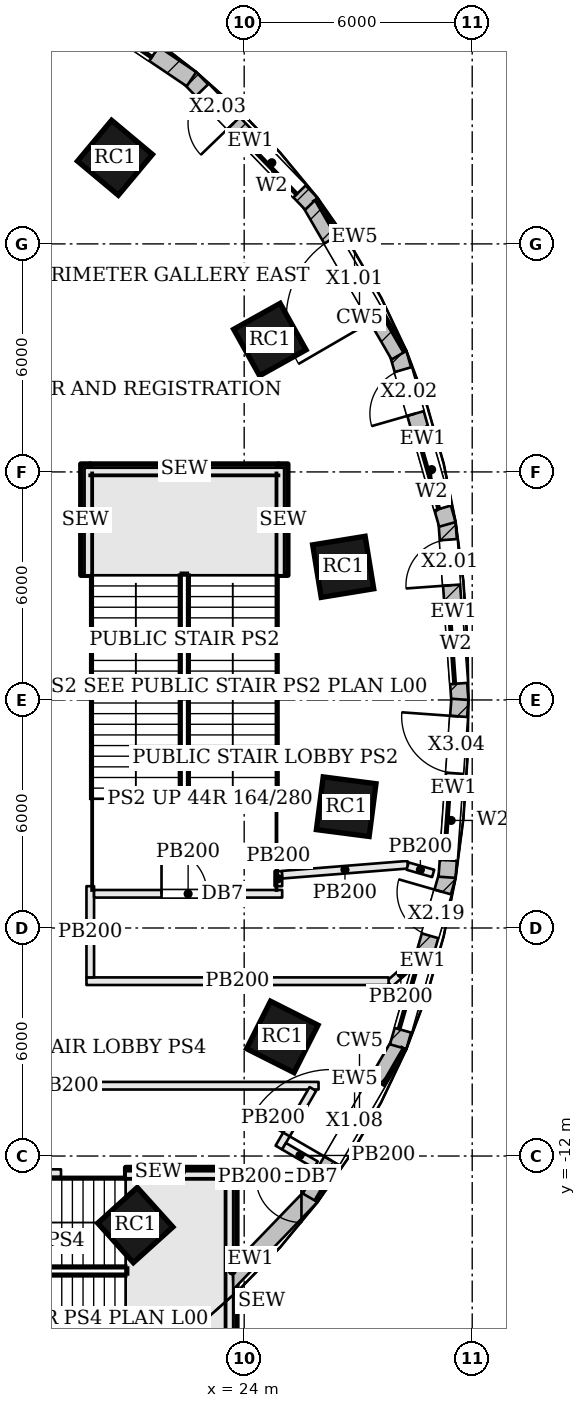
"""IFC4 building model, lengths in metres.
Left out: names, types, materials, properties, quantities, classifications, styles, units other than length and angle.
Written with IfcOpenShell. Run it as: python <this file> out.ifc"""

import sys

from ifc_helpers import new_model, si_unit, direction, frame, frame_2d, origin, origin_2d, place, context, subcontext, project, spatial, rectangle, extrude, element, fill, save


model = new_model("IFC4")
c1 = context("Model", 3, precision=1e-05, world=origin(), true_north=direction((0.0, 1.0)))
c2 = subcontext(c1, "Body", "Model", "MODEL_VIEW")
j1 = project(units=[si_unit("LENGTHUNIT", "METRE"), si_unit("PLANEANGLEUNIT", "RADIAN")], contexts=[c1])
p1 = place(None, origin())
s1 = spatial("IfcSite", under=j1, at=p1, CompositionType="ELEMENT")
p2 = place(p1, origin())
s2 = spatial("IfcBuilding", under=s1, at=p2, CompositionType="ELEMENT")
p3 = place(p2, origin())
s3 = spatial("IfcBuildingStorey", under=s2, at=p3, CompositionType="ELEMENT", Elevation=0.0)
for number, where, z_axis, x_axis in (
    (1, (26.605, 3.503, 0.0), (0.0, 0.0, 1.0), (-0.161, 0.987, 0.0)),
    (2, (24.676, 9.483, 0.0), (0.0, 0.0, 1.0), (-0.487, 0.873, 0.0)),
    (3, (20.6, 14.266, 0.0), (0.0, 0.0, 1.0), (-0.767, 0.641, 0.0)),
    (4, (21.135, -13.817, 0.0), (0.0, 0.0, 1.0), (0.743, 0.67, 0.0)),
    (5, (25.003, -8.866, 0.0), (0.0, 0.0, 1.0), (0.45, 0.893, 0.0)),
    (6, (26.684, -2.808, 0.0), (0.0, 0.0, 1.0), (0.128, 0.992, 0.0)),
):
    element("IfcColumn", number, at=place(p3, frame(where, z_axis=z_axis, x_axis=x_axis)), inside=s3, PredefinedType="COLUMN", context=c2, shape_type="SweptSolid", body=[
        extrude(rectangle(XDim=1.4, YDim=1.4, at=origin_2d()), origin(), (0.0, 0.0, 1.0), 7.2),
    ])
p4 = place(p3, frame((29.676, -0.016, 0.0), z_axis=(0.0, 0.0, 1.0), x_axis=(-0.071775601577, 0.997420805387, 0.0)))
e7 = element("IfcWall", 7, at=p4, inside=s3, PredefinedType="SOLIDWALL", context=c2, shape_type="SweptSolid", body=[
    extrude(rectangle(XDim=4.694, YDim=0.45, at=frame_2d((2.347, 0.0))), origin(), (0.0, 0.0, 1.0), 6.95),
])
p5 = place(p4, frame((0.45, 0.0, 0.9)))
e8 = element("IfcOpeningElement", 8, at=p5, cuts=e7, PredefinedType="OPENING", context=c2, shape_type="SweptSolid", body=[
    extrude(rectangle(XDim=2.1, YDim=5.0, at=frame_2d((1.05, 2.5))), frame((0.0, 0.235, 0.0), z_axis=(0.0, -1.0, 0.0), x_axis=(1.0, 0.0, 0.0)), (0.0, 0.0, 1.0), 0.47),
])
p6 = place(p4, frame((3.044, 0.0, 0.0)))
e9 = element("IfcOpeningElement", 9, at=p6, cuts=e7, PredefinedType="OPENING", context=c2, shape_type="SweptSolid", body=[
    extrude(rectangle(XDim=1.2, YDim=2.4, at=frame_2d((0.6, 1.2))), frame((0.0, 0.235, 0.0), z_axis=(0.0, -1.0, 0.0), x_axis=(1.0, 0.0, 0.0)), (0.0, 0.0, 1.0), 0.47),
])
p7 = place(p3, frame((29.347, 4.62, 0.0), z_axis=(0.0, 0.0, 1.0), x_axis=(-0.27637239746, 0.961050621935, 0.0)))
e10 = element("IfcWall", 10, at=p7, inside=s3, PredefinedType="SOLIDWALL", context=c2, shape_type="SweptSolid", body=[
    extrude(rectangle(XDim=4.685, YDim=0.45, at=frame_2d((2.343, 0.0))), origin(), (0.0, 0.0, 1.0), 6.95),
])
p8 = place(p7, frame((0.45, 0.0, 0.9)))
e11 = element("IfcOpeningElement", 11, at=p8, cuts=e10, PredefinedType="OPENING", context=c2, shape_type="SweptSolid", body=[
    extrude(rectangle(XDim=2.1, YDim=5.0, at=frame_2d((1.05, 2.5))), frame((0.0, 0.235, 0.0), z_axis=(0.0, -1.0, 0.0), x_axis=(1.0, 0.0, 0.0)), (0.0, 0.0, 1.0), 0.47),
])
p9 = place(p7, frame((3.035, 0.0, 0.0)))
e12 = element("IfcOpeningElement", 12, at=p9, cuts=e10, PredefinedType="OPENING", context=c2, shape_type="SweptSolid", body=[
    extrude(rectangle(XDim=1.2, YDim=2.4, at=frame_2d((0.6, 1.2))), frame((0.0, 0.235, 0.0), z_axis=(0.0, -1.0, 0.0), x_axis=(1.0, 0.0, 0.0)), (0.0, 0.0, 1.0), 0.47),
])
p10 = place(p3, frame((28.073, 9.072, 0.0), z_axis=(0.0, 0.0, 1.0), x_axis=(-0.502106426501, 0.864805837438, 0.0)))
e13 = element("IfcWall", 13, at=p10, inside=s3, PredefinedType="SOLIDWALL", context=c2, shape_type="SweptSolid", body=[
    extrude(rectangle(XDim=4.657, YDim=0.45, at=frame_2d((2.328, 0.0))), origin(), (0.0, 0.0, 1.0), 3.55),
])
p11 = place(p10, frame((1.128, 0.0, 0.0)))
e14 = element("IfcOpeningElement", 14, at=p11, cuts=e13, PredefinedType="OPENING", context=c2, shape_type="SweptSolid", body=[
    extrude(rectangle(XDim=2.4, YDim=3.2, at=frame_2d((1.2, 1.6))), frame((0.0, 0.235, 0.0), z_axis=(0.0, -1.0, 0.0), x_axis=(1.0, 0.0, 0.0)), (0.0, 0.0, 1.0), 0.47),
])
p12 = place(p3, frame((25.768, 13.056, 0.0), z_axis=(0.0, 0.0, 1.0), x_axis=(-0.694191591241, 0.719790271294, 0.0)))
e15 = element("IfcWall", 15, at=p12, inside=s3, PredefinedType="SOLIDWALL", context=c2, shape_type="SweptSolid", body=[
    extrude(rectangle(XDim=4.597, YDim=0.45, at=frame_2d((2.298, 0.0))), origin(), (0.0, 0.0, 1.0), 6.95),
])
p13 = place(p12, frame((0.45, 0.0, 0.9)))
e16 = element("IfcOpeningElement", 16, at=p13, cuts=e15, PredefinedType="OPENING", context=c2, shape_type="SweptSolid", body=[
    extrude(rectangle(XDim=2.1, YDim=5.0, at=frame_2d((1.05, 2.5))), frame((0.0, 0.235, 0.0), z_axis=(0.0, -1.0, 0.0), x_axis=(1.0, 0.0, 0.0)), (0.0, 0.0, 1.0), 0.47),
])
p14 = place(p12, frame((2.947, 0.0, 0.0)))
e17 = element("IfcOpeningElement", 17, at=p14, cuts=e15, PredefinedType="OPENING", context=c2, shape_type="SweptSolid", body=[
    extrude(rectangle(XDim=1.2, YDim=2.4, at=frame_2d((0.6, 1.2))), frame((0.0, 0.235, 0.0), z_axis=(0.0, -1.0, 0.0), x_axis=(1.0, 0.0, 0.0)), (0.0, 0.0, 1.0), 0.47),
])
p15 = place(p3, frame((22.613, 16.334, 0.0), z_axis=(0.0, 0.0, 1.0), x_axis=(-0.828976924359, 0.559282807604, 0.0)))
e18 = element("IfcWall", 18, at=p15, inside=s3, PredefinedType="SOLIDWALL", context=c2, shape_type="SweptSolid", body=[
    extrude(rectangle(XDim=4.479, YDim=0.45, at=frame_2d((2.24, 0.0))), origin(), (0.0, 0.0, 1.0), 6.95),
])
p16 = place(p15, frame((1.189, 0.0, 0.9)))
e19 = element("IfcOpeningElement", 19, at=p16, cuts=e18, PredefinedType="OPENING", context=c2, shape_type="SweptSolid", body=[
    extrude(rectangle(XDim=2.1, YDim=5.0, at=frame_2d((1.05, 2.5))), frame((0.0, 0.235, 0.0), z_axis=(0.0, -1.0, 0.0), x_axis=(1.0, 0.0, 0.0)), (0.0, 0.0, 1.0), 0.47),
])
p17 = place(p3, frame((18.9, -18.84, 0.0), z_axis=(0.0, 0.0, 1.0), x_axis=(0.828976924359, 0.559282807604, 0.0)))
e20 = element("IfcWall", 20, at=p17, inside=s3, PredefinedType="SOLIDWALL", context=c2, shape_type="SweptSolid", body=[
    extrude(rectangle(XDim=4.479, YDim=0.45, at=frame_2d((2.24, 0.0))), origin(), (0.0, 0.0, 1.0), 6.95),
])
p18 = place(p3, frame((22.577, -16.365, 0.0), z_axis=(0.0, 0.0, 1.0), x_axis=(0.694191591241, 0.719790271294, 0.0)))
e21 = element("IfcWall", 21, at=p18, inside=s3, PredefinedType="SOLIDWALL", context=c2, shape_type="SweptSolid", body=[
    extrude(rectangle(XDim=4.597, YDim=0.45, at=frame_2d((2.298, 0.0))), origin(), (0.0, 0.0, 1.0), 6.95),
])
p19 = place(p3, frame((25.735, -13.099, 0.0), z_axis=(0.0, 0.0, 1.0), x_axis=(0.502106426501, 0.864805837438, 0.0)))
e22 = element("IfcWall", 22, at=p19, inside=s3, PredefinedType="SOLIDWALL", context=c2, shape_type="SweptSolid", body=[
    extrude(rectangle(XDim=4.657, YDim=0.45, at=frame_2d((2.328, 0.0))), origin(), (0.0, 0.0, 1.0), 3.55),
])
p20 = place(p19, frame((1.128, 0.0, 0.0)))
e23 = element("IfcOpeningElement", 23, at=p20, cuts=e22, PredefinedType="OPENING", context=c2, shape_type="SweptSolid", body=[
    extrude(rectangle(XDim=2.4, YDim=3.2, at=frame_2d((1.2, 1.6))), frame((0.0, 0.235, 0.0), z_axis=(0.0, -1.0, 0.0), x_axis=(1.0, 0.0, 0.0)), (0.0, 0.0, 1.0), 0.47),
])
p21 = place(p3, frame((28.052, -9.123, 0.0), z_axis=(0.0, 0.0, 1.0), x_axis=(0.27637239746, 0.961050621935, 0.0)))
e24 = element("IfcWall", 24, at=p21, inside=s3, PredefinedType="SOLIDWALL", context=c2, shape_type="SweptSolid", body=[
    extrude(rectangle(XDim=4.685, YDim=0.45, at=frame_2d((2.343, 0.0))), origin(), (0.0, 0.0, 1.0), 6.95),
])
p22 = place(p21, frame((0.45, 0.0, 0.9)))
e25 = element("IfcOpeningElement", 25, at=p22, cuts=e24, PredefinedType="OPENING", context=c2, shape_type="SweptSolid", body=[
    extrude(rectangle(XDim=2.1, YDim=5.0, at=frame_2d((1.05, 2.5))), frame((0.0, 0.235, 0.0), z_axis=(0.0, -1.0, 0.0), x_axis=(1.0, 0.0, 0.0)), (0.0, 0.0, 1.0), 0.47),
])
p23 = place(p21, frame((3.035, 0.0, 0.0)))
e26 = element("IfcOpeningElement", 26, at=p23, cuts=e24, PredefinedType="OPENING", context=c2, shape_type="SweptSolid", body=[
    extrude(rectangle(XDim=1.2, YDim=2.4, at=frame_2d((0.6, 1.2))), frame((0.0, 0.235, 0.0), z_axis=(0.0, -1.0, 0.0), x_axis=(1.0, 0.0, 0.0)), (0.0, 0.0, 1.0), 0.47),
])
p24 = place(p3, frame((29.339, -4.666, 0.0), z_axis=(0.0, 0.0, 1.0), x_axis=(0.071775601577, 0.997420805387, 0.0)))
e27 = element("IfcWall", 27, at=p24, inside=s3, PredefinedType="SOLIDWALL", context=c2, shape_type="SweptSolid", body=[
    extrude(rectangle(XDim=4.694, YDim=0.45, at=frame_2d((2.347, 0.0))), origin(), (0.0, 0.0, 1.0), 6.95),
])
p25 = place(p24, frame((0.45, 0.0, 0.9)))
e28 = element("IfcOpeningElement", 28, at=p25, cuts=e27, PredefinedType="OPENING", context=c2, shape_type="SweptSolid", body=[
    extrude(rectangle(XDim=2.1, YDim=5.0, at=frame_2d((1.05, 2.5))), frame((0.0, 0.235, 0.0), z_axis=(0.0, -1.0, 0.0), x_axis=(1.0, 0.0, 0.0)), (0.0, 0.0, 1.0), 0.47),
])
p26 = place(p24, frame((2.744, 0.0, 0.0)))
e29 = element("IfcOpeningElement", 29, at=p26, cuts=e27, PredefinedType="OPENING", context=c2, shape_type="SweptSolid", body=[
    extrude(rectangle(XDim=1.5, YDim=2.4, at=frame_2d((0.75, 1.2))), frame((0.0, 0.235, 0.0), z_axis=(0.0, -1.0, 0.0), x_axis=(1.0, 0.0, 0.0)), (0.0, 0.0, 1.0), 0.47),
])
p27 = place(p3, frame((28.419, -6.939, 0.0), z_axis=(0.0, 0.0, 1.0), x_axis=(-0.747968781753, -0.663733908674, 0.0)))
e30 = element("IfcWall", 30, at=p27, inside=s3, PredefinedType="PARTITIONING", context=c2, shape_type="SweptSolid", body=[
    extrude(rectangle(XDim=0.794, YDim=0.2, at=frame_2d((0.397, 0.0))), origin(), (0.0, 0.0, 1.0), 6.23),
])
p28 = place(p3, frame((27.8, -7.4, 0.0), z_axis=(0.0, 0.0, 1.0), x_axis=(-1.0, 0.0, 0.0)))
e31 = element("IfcWall", 31, at=p28, inside=s3, PredefinedType="PARTITIONING", context=c2, shape_type="SweptSolid", body=[
    extrude(rectangle(XDim=7.95, YDim=0.2, at=frame_2d((3.975, 0.0))), origin(), (0.0, 0.0, 1.0), 6.23),
])
p29 = place(p3, frame((19.95, -7.3, 0.0), z_axis=(0.0, 0.0, 1.0), x_axis=(0.0, 1.0, 0.0)))
e32 = element("IfcWall", 32, at=p29, inside=s3, PredefinedType="PARTITIONING", context=c2, shape_type="SweptSolid", body=[
    extrude(rectangle(XDim=2.4, YDim=0.2, at=frame_2d((1.2, 0.0))), origin(), (0.0, 0.0, 1.0), 6.23),
])
p30 = place(p3, frame((20.05, -5.1, 0.0), z_axis=(0.0, 0.0, 1.0), x_axis=(1.0, 0.0, 0.0)))
e33 = element("IfcWall", 33, at=p30, inside=s3, PredefinedType="PARTITIONING", context=c2, shape_type="SweptSolid", body=[
    extrude(rectangle(XDim=4.95, YDim=0.2, at=frame_2d((2.475, 0.0))), origin(), (0.0, 0.0, 1.0), 6.23),
])
p31 = place(p30, frame((1.775, 0.0, 0.0)))
e34 = element("IfcOpeningElement", 34, at=p31, cuts=e33, PredefinedType="OPENING", context=c2, shape_type="SweptSolid", body=[
    extrude(rectangle(XDim=1.2, YDim=2.1, at=frame_2d((0.6, 1.05))), frame((0.0, 0.11, 0.0), z_axis=(0.0, -1.0, 0.0), x_axis=(1.0, 0.0, 0.0)), (0.0, 0.0, 1.0), 0.22),
])
p32 = place(p3, frame((24.9, -4.9, 0.0), z_axis=(0.0, 0.0, 1.0), x_axis=(0.0, 1.0, 0.0)))
e35 = element("IfcWall", 35, at=p32, inside=s3, PredefinedType="PARTITIONING", context=c2, shape_type="SweptSolid", body=[
    extrude(rectangle(XDim=0.394, YDim=0.2, at=frame_2d((0.197, 0.0))), origin(), (0.0, 0.0, 1.0), 6.23),
])
p33 = place(p3, frame((25.0, -4.598, 0.0), z_axis=(0.0, 0.0, 1.0), x_axis=(0.996848217345, 0.079332411888, 0.0)))
e36 = element("IfcWall", 36, at=p33, inside=s3, PredefinedType="PARTITIONING", context=c2, shape_type="SweptSolid", body=[
    extrude(rectangle(XDim=3.314, YDim=0.2, at=frame_2d((1.657, 0.0))), origin(), (0.0, 0.0, 1.0), 6.23),
])
p34 = place(p3, frame((28.3, -4.371, 0.0), z_axis=(0.0, 0.0, 1.0), x_axis=(0.961286670839, -0.275550243092, 0.0)))
e37 = element("IfcWall", 37, at=p34, inside=s3, PredefinedType="PARTITIONING", context=c2, shape_type="SweptSolid", body=[
    extrude(rectangle(XDim=0.7, YDim=0.2, at=frame_2d((0.35, 0.0))), origin(), (0.0, 0.0, 1.0), 6.23),
])
p35 = place(p3, frame((25.66, -12.55, 0.0), z_axis=(0.0, 0.0, 1.0), x_axis=(-1.0, 0.0, 0.0)))
e38 = element("IfcWall", 38, at=p35, inside=s3, PredefinedType="PARTITIONING", context=c2, shape_type="SweptSolid", body=[
    extrude(rectangle(XDim=1.83, YDim=0.2, at=frame_2d((0.915, 0.0))), origin(), (0.0, 0.0, 1.0), 6.23),
])
p36 = place(p35, frame((0.153, 0.0, 0.0)))
e39 = element("IfcOpeningElement", 39, at=p36, cuts=e38, PredefinedType="OPENING", context=c2, shape_type="SweptSolid", body=[
    extrude(rectangle(XDim=1.2, YDim=2.1, at=frame_2d((0.6, 1.05))), frame((0.0, 0.11, 0.0), z_axis=(0.0, -1.0, 0.0), x_axis=(1.0, 0.0, 0.0)), (0.0, 0.0, 1.0), 0.22),
])
p37 = place(p3, frame((19.18, -12.45, 0.0), z_axis=(0.0, 0.0, 1.0), x_axis=(-1.0, 0.0, 0.0)))
e40 = element("IfcWall", 40, at=p37, inside=s3, PredefinedType="PARTITIONING", context=c2, shape_type="SweptSolid", body=[
    extrude(rectangle(XDim=6.68, YDim=0.2, at=frame_2d((3.34, 0.0))), origin(), (0.0, 0.0, 1.0), 6.23),
])
p38 = place(p37, frame((4.78, 0.0, 0.0)))
e41 = element("IfcOpeningElement", 41, at=p38, cuts=e40, PredefinedType="OPENING", context=c2, shape_type="SweptSolid", body=[
    extrude(rectangle(XDim=1.2, YDim=2.1, at=frame_2d((0.6, 1.05))), frame((0.0, 0.11, 0.0), z_axis=(0.0, -1.0, 0.0), x_axis=(1.0, 0.0, 0.0)), (0.0, 0.0, 1.0), 0.22),
])
p39 = place(p3, frame((12.7, -10.15, 0.0), z_axis=(0.0, 0.0, 1.0), x_axis=(1.0, 0.0, 0.0)))
e42 = element("IfcWall", 42, at=p39, inside=s3, PredefinedType="PARTITIONING", context=c2, shape_type="SweptSolid", body=[
    extrude(rectangle(XDim=13.257, YDim=0.2, at=frame_2d((6.628, 0.0))), origin(), (0.0, 0.0, 1.0), 6.23),
])
p40 = place(p3, frame((25.807, -10.236, 0.0), z_axis=(0.0, 0.0, 1.0), x_axis=(-0.50189432983, -0.864928946032, 0.0)))
e43 = element("IfcWall", 43, at=p40, inside=s3, PredefinedType="PARTITIONING", context=c2, shape_type="SweptSolid", body=[
    extrude(rectangle(XDim=1.783, YDim=0.2, at=frame_2d((0.891, 0.0))), origin(), (0.0, 0.0, 1.0), 6.23),
])
p41 = place(p3, frame((25.048, -11.742, 0.0), z_axis=(0.0, 0.0, 1.0), x_axis=(0.864728870448, -0.502238967638, 0.0)))
e44 = element("IfcWall", 44, at=p41, inside=s3, PredefinedType="PARTITIONING", context=c2, shape_type="SweptSolid", body=[
    extrude(rectangle(XDim=0.968, YDim=0.2, at=frame_2d((0.484, 0.0))), origin(), (0.0, 0.0, 1.0), 6.23),
])
p42 = place(p3, frame((24.9, 6.085, 0.0), z_axis=(0.0, 0.0, 1.0), x_axis=(-1.0, 0.0, 0.0)))
e45 = element("IfcWall", 45, at=p42, inside=s3, PredefinedType="SOLIDWALL", context=c2, shape_type="SweptSolid", body=[
    extrude(rectangle(XDim=4.95, YDim=0.25, at=frame_2d((2.475, 0.0))), origin(), (0.0, 0.0, 1.0), 6.95),
])
for number, where, z_axis, x_axis in (
    (46, (19.825, 3.28, 0.0), (0.0, 0.0, 1.0), (0.0, 1.0, 0.0)),
    (47, (25.025, 3.28, 0.0), (0.0, 0.0, 1.0), (0.0, 1.0, 0.0)),
):
    element("IfcWall", number, at=place(p3, frame(where, z_axis=z_axis, x_axis=x_axis)), inside=s3, PredefinedType="SOLIDWALL", context=c2, shape_type="SweptSolid", body=[
        extrude(rectangle(XDim=2.93, YDim=0.25, at=frame_2d((1.465, 0.0))), origin(), (0.0, 0.0, 1.0), 6.95),
    ])
p43 = place(p3, frame((23.685, -17.5, 0.0), z_axis=(0.0, 0.0, 1.0), x_axis=(0.0, 1.0, 0.0)))
e48 = element("IfcWall", 48, at=p43, inside=s3, PredefinedType="SOLIDWALL", context=c2, shape_type="SweptSolid", body=[
    extrude(rectangle(XDim=4.95, YDim=0.25, at=frame_2d((2.475, 0.0))), origin(), (0.0, 0.0, 1.0), 6.95),
])
p44 = place(p3, frame((20.88, -12.425, 0.0), z_axis=(0.0, 0.0, 1.0), x_axis=(1.0, 0.0, 0.0)))
e49 = element("IfcWall", 49, at=p44, inside=s3, PredefinedType="SOLIDWALL", context=c2, shape_type="SweptSolid", body=[
    extrude(rectangle(XDim=2.93, YDim=0.25, at=frame_2d((1.465, 0.0))), origin(), (0.0, 0.0, 1.0), 6.95),
])
p45 = place(p5, origin())
e50 = element("IfcWindow", 50, at=p45, inside=s3, PartitioningType="SINGLE_PANEL", PredefinedType="WINDOW", context=c2, shape_type="SweptSolid", body=[
    extrude(rectangle(XDim=2.1, YDim=5.0, at=frame_2d((1.05, 2.5))), frame((0.0, 0.135, 0.0), z_axis=(0.0, -1.0, 0.0), x_axis=(1.0, 0.0, 0.0)), (0.0, 0.0, 1.0), 0.06),
])
fill(e8, e50)
p46 = place(p6, frame((1.2, 0.0, 0.0), z_axis=(0.0, 0.0, 1.0), x_axis=(-1.0, 0.0, 0.0)))
e51 = element("IfcDoor", 51, at=p46, inside=s3, OperationType="SINGLE_SWING_LEFT", PredefinedType="DOOR", context=c2, shape_type="SweptSolid", body=[
    extrude(rectangle(XDim=1.2, YDim=2.4, at=frame_2d((0.6, 1.2))), frame((0.0, 0.025, 0.0), z_axis=(0.0, -1.0, 0.0), x_axis=(1.0, 0.0, 0.0)), (0.0, 0.0, 1.0), 0.05),
])
fill(e9, e51)
p47 = place(p8, origin())
e52 = element("IfcWindow", 52, at=p47, inside=s3, PartitioningType="SINGLE_PANEL", PredefinedType="WINDOW", context=c2, shape_type="SweptSolid", body=[
    extrude(rectangle(XDim=2.1, YDim=5.0, at=frame_2d((1.05, 2.5))), frame((0.0, 0.135, 0.0), z_axis=(0.0, -1.0, 0.0), x_axis=(1.0, 0.0, 0.0)), (0.0, 0.0, 1.0), 0.06),
])
fill(e11, e52)
p48 = place(p9, frame((1.2, 0.0, 0.0), z_axis=(0.0, 0.0, 1.0), x_axis=(-1.0, 0.0, 0.0)))
e53 = element("IfcDoor", 53, at=p48, inside=s3, OperationType="SINGLE_SWING_LEFT", PredefinedType="DOOR", context=c2, shape_type="SweptSolid", body=[
    extrude(rectangle(XDim=1.2, YDim=2.4, at=frame_2d((0.6, 1.2))), frame((0.0, 0.025, 0.0), z_axis=(0.0, -1.0, 0.0), x_axis=(1.0, 0.0, 0.0)), (0.0, 0.0, 1.0), 0.05),
])
fill(e12, e53)
p49 = place(p11, origin())
e54 = element("IfcDoor", 54, at=p49, inside=s3, OperationType="DOUBLE_DOOR_DOUBLE_SWING", PredefinedType="DOOR", context=c2, shape_type="SweptSolid", body=[
    extrude(rectangle(XDim=2.4, YDim=3.2, at=frame_2d((1.2, 1.6))), frame((0.0, 0.025, 0.0), z_axis=(0.0, -1.0, 0.0), x_axis=(1.0, 0.0, 0.0)), (0.0, 0.0, 1.0), 0.05),
])
fill(e14, e54)
p50 = place(p13, origin())
e55 = element("IfcWindow", 55, at=p50, inside=s3, PartitioningType="SINGLE_PANEL", PredefinedType="WINDOW", context=c2, shape_type="SweptSolid", body=[
    extrude(rectangle(XDim=2.1, YDim=5.0, at=frame_2d((1.05, 2.5))), frame((0.0, 0.135, 0.0), z_axis=(0.0, -1.0, 0.0), x_axis=(1.0, 0.0, 0.0)), (0.0, 0.0, 1.0), 0.06),
])
fill(e16, e55)
p51 = place(p14, frame((1.2, 0.0, 0.0), z_axis=(0.0, 0.0, 1.0), x_axis=(-1.0, 0.0, 0.0)))
e56 = element("IfcDoor", 56, at=p51, inside=s3, OperationType="SINGLE_SWING_LEFT", PredefinedType="DOOR", context=c2, shape_type="SweptSolid", body=[
    extrude(rectangle(XDim=1.2, YDim=2.4, at=frame_2d((0.6, 1.2))), frame((0.0, 0.025, 0.0), z_axis=(0.0, -1.0, 0.0), x_axis=(1.0, 0.0, 0.0)), (0.0, 0.0, 1.0), 0.05),
])
fill(e17, e56)
p52 = place(p16, origin())
e57 = element("IfcWindow", 57, at=p52, inside=s3, PartitioningType="SINGLE_PANEL", PredefinedType="WINDOW", context=c2, shape_type="SweptSolid", body=[
    extrude(rectangle(XDim=2.1, YDim=5.0, at=frame_2d((1.05, 2.5))), frame((0.0, 0.135, 0.0), z_axis=(0.0, -1.0, 0.0), x_axis=(1.0, 0.0, 0.0)), (0.0, 0.0, 1.0), 0.06),
])
fill(e19, e57)
p53 = place(p20, origin())
e58 = element("IfcDoor", 58, at=p53, inside=s3, OperationType="DOUBLE_DOOR_DOUBLE_SWING", PredefinedType="DOOR", context=c2, shape_type="SweptSolid", body=[
    extrude(rectangle(XDim=2.4, YDim=3.2, at=frame_2d((1.2, 1.6))), frame((0.0, 0.025, 0.0), z_axis=(0.0, -1.0, 0.0), x_axis=(1.0, 0.0, 0.0)), (0.0, 0.0, 1.0), 0.05),
])
fill(e23, e58)
p54 = place(p22, origin())
e59 = element("IfcWindow", 59, at=p54, inside=s3, PartitioningType="SINGLE_PANEL", PredefinedType="WINDOW", context=c2, shape_type="SweptSolid", body=[
    extrude(rectangle(XDim=2.1, YDim=5.0, at=frame_2d((1.05, 2.5))), frame((0.0, 0.135, 0.0), z_axis=(0.0, -1.0, 0.0), x_axis=(1.0, 0.0, 0.0)), (0.0, 0.0, 1.0), 0.06),
])
fill(e25, e59)
p55 = place(p23, frame((1.2, 0.0, 0.0), z_axis=(0.0, 0.0, 1.0), x_axis=(-1.0, 0.0, 0.0)))
e60 = element("IfcDoor", 60, at=p55, inside=s3, OperationType="SINGLE_SWING_RIGHT", PredefinedType="DOOR", context=c2, shape_type="SweptSolid", body=[
    extrude(rectangle(XDim=1.2, YDim=2.4, at=frame_2d((0.6, 1.2))), frame((0.0, 0.025, 0.0), z_axis=(0.0, -1.0, 0.0), x_axis=(1.0, 0.0, 0.0)), (0.0, 0.0, 1.0), 0.05),
])
fill(e26, e60)
p56 = place(p25, origin())
e61 = element("IfcWindow", 61, at=p56, inside=s3, PartitioningType="SINGLE_PANEL", PredefinedType="WINDOW", context=c2, shape_type="SweptSolid", body=[
    extrude(rectangle(XDim=2.1, YDim=5.0, at=frame_2d((1.05, 2.5))), frame((0.0, 0.135, 0.0), z_axis=(0.0, -1.0, 0.0), x_axis=(1.0, 0.0, 0.0)), (0.0, 0.0, 1.0), 0.06),
])
fill(e28, e61)
p57 = place(p26, frame((1.5, 0.0, 0.0), z_axis=(0.0, 0.0, 1.0), x_axis=(-1.0, 0.0, 0.0)))
e62 = element("IfcDoor", 62, at=p57, inside=s3, OperationType="SINGLE_SWING_RIGHT", PredefinedType="DOOR", context=c2, shape_type="SweptSolid", body=[
    extrude(rectangle(XDim=1.5, YDim=2.4, at=frame_2d((0.75, 1.2))), frame((0.0, 0.025, 0.0), z_axis=(0.0, -1.0, 0.0), x_axis=(1.0, 0.0, 0.0)), (0.0, 0.0, 1.0), 0.05),
])
fill(e29, e62)
p58 = place(p31, origin())
e63 = element("IfcDoor", 63, at=p58, inside=s3, OperationType="SINGLE_SWING_LEFT", PredefinedType="DOOR", context=c2, shape_type="SweptSolid", body=[
    extrude(rectangle(XDim=1.2, YDim=2.1, at=frame_2d((0.6, 1.05))), frame((0.0, 0.025, 0.0), z_axis=(0.0, -1.0, 0.0), x_axis=(1.0, 0.0, 0.0)), (0.0, 0.0, 1.0), 0.05),
])
fill(e34, e63)
p59 = place(p36, origin())
e64 = element("IfcDoor", 64, at=p59, inside=s3, OperationType="SINGLE_SWING_LEFT", PredefinedType="DOOR", context=c2, shape_type="SweptSolid", body=[
    extrude(rectangle(XDim=1.2, YDim=2.1, at=frame_2d((0.6, 1.05))), frame((0.0, 0.025, 0.0), z_axis=(0.0, -1.0, 0.0), x_axis=(1.0, 0.0, 0.0)), (0.0, 0.0, 1.0), 0.05),
])
fill(e39, e64)
save(model, sys.argv[1])
